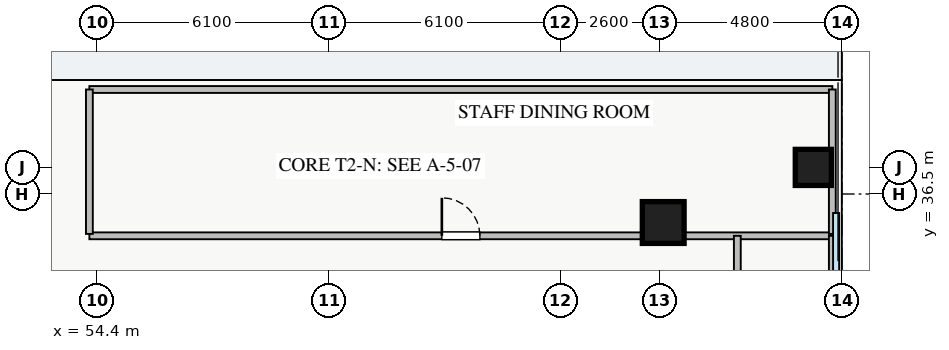
"""IFC4 building model, lengths in metres.
Left out: names, types, materials, properties, quantities, classifications, styles, units other than length and angle.
Written with IfcOpenShell. Run it as: python <this file> out.ifc"""

import sys

from ifc_helpers import new_model, si_unit, direction, frame, frame_2d, origin, origin_2d, place, context, subcontext, project, spatial, rectangle, extrude, source, transform, mapped, element, fill, save


model = new_model("IFC4")
c1 = context("Model", 3, precision=1e-05, world=origin(), true_north=direction((0.0, 1.0)))
c2 = subcontext(c1, "Body", "Model", "MODEL_VIEW")
j1 = project(units=[si_unit("LENGTHUNIT", "METRE"), si_unit("PLANEANGLEUNIT", "RADIAN")], contexts=[c1])
p1 = place(None, origin())
s1 = spatial("IfcSite", under=j1, at=p1, CompositionType="ELEMENT")
p2 = place(p1, origin())
s2 = spatial("IfcBuilding", under=s1, at=p2, CompositionType="ELEMENT")
p3 = place(p2, frame((0.0, 0.0, 18.2)))
s3 = spatial("IfcBuildingStorey", under=s2, at=p3, CompositionType="ELEMENT", Elevation=18.2)
m1 = source(origin(), c2, "Body", "SweptSolid", [
    extrude(rectangle(XDim=1.1, YDim=1.1, at=origin_2d()), origin(), (0.0, 0.0, 1.0), 4.8),
])
p4 = place(p3, frame((69.3, 35.75, 0.0), z_axis=(0.0, 0.0, 1.0), x_axis=(1.0, 0.0, 0.0)))
e1 = element("IfcColumn", 1, at=p4, inside=s3, PredefinedType="COLUMN", context=c2, shape_type="MappedRepresentation", body=[
    mapped(m1, transform((0.0, 0.0, 0.0), x_axis=(1.0, 0.0, 0.0), y_axis=(0.0, 1.0, 0.0), z_axis=(0.0, 0.0, 1.0), scale=1.0)),
])
m2 = source(origin(), c2, "Body", "SweptSolid", [
    extrude(rectangle(XDim=0.95, YDim=0.95, at=origin_2d()), origin(), (0.0, 0.0, 1.0), 4.8),
])
p5 = place(p3, frame((73.25, 37.2, 0.0), z_axis=(0.0, 0.0, 1.0), x_axis=(1.0, 0.0, 0.0)))
e2 = element("IfcColumn", 2, at=p5, inside=s3, PredefinedType="COLUMN", context=c2, shape_type="MappedRepresentation", body=[
    mapped(m2, transform((0.0, 0.0, 0.0), x_axis=(1.0, 0.0, 0.0), y_axis=(0.0, 1.0, 0.0), z_axis=(0.0, 0.0, 1.0), scale=1.0)),
])
p6 = place(p3, frame((54.2, 35.4, 0.0), z_axis=(0.0, 0.0, 1.0), x_axis=(1.0, 0.0, 0.0)))
e3 = element("IfcWall", 3, at=p6, inside=s3, PredefinedType="PARTITIONING", context=c2, shape_type="SweptSolid", body=[
    extrude(rectangle(XDim=19.55, YDim=0.18, at=frame_2d((9.775, 0.0))), origin(), (0.0, 0.0, 1.0), 4.62),
])
p7 = place(p6, frame((9.275, 0.0, 0.0)))
e4 = element("IfcOpeningElement", 4, at=p7, cuts=e3, PredefinedType="OPENING", context=c2, shape_type="SweptSolid", body=[
    extrude(rectangle(XDim=1.0, YDim=2.05, at=frame_2d((0.5, 1.025))), frame((0.0, 0.1, 0.0), z_axis=(0.0, -1.0, 0.0), x_axis=(1.0, 0.0, 0.0)), (0.0, 0.0, 1.0), 0.2),
])
p8 = place(p3, frame((71.25, 10.6, 0.0), z_axis=(0.0, 0.0, 1.0), x_axis=(0.0, 1.0, 0.0)))
e5 = element("IfcWall", 5, at=p8, inside=s3, PredefinedType="PARTITIONING", context=c2, shape_type="SweptSolid", body=[
    extrude(rectangle(XDim=24.8, YDim=0.18, at=frame_2d((12.4, 0.0))), origin(), (0.0, 0.0, 1.0), 4.62),
])
p9 = place(p8, frame((11.9, 0.0, 0.0)))
e6 = element("IfcOpeningElement", 6, at=p9, cuts=e5, PredefinedType="OPENING", context=c2, shape_type="SweptSolid", body=[
    extrude(rectangle(XDim=1.0, YDim=2.05, at=frame_2d((0.5, 1.025))), frame((0.0, 0.1, 0.0), z_axis=(0.0, -1.0, 0.0), x_axis=(1.0, 0.0, 0.0)), (0.0, 0.0, 1.0), 0.2),
])
p10 = place(p3, frame((73.75, 10.6, 0.0), z_axis=(0.0, 0.0, 1.0), x_axis=(0.0, 1.0, 0.0)))
e7 = element("IfcWall", 7, at=p10, inside=s3, PredefinedType="PARTITIONING", context=c2, shape_type="SweptSolid", body=[
    extrude(rectangle(XDim=24.8, YDim=0.18, at=frame_2d((12.4, 0.0))), origin(), (0.0, 0.0, 1.0), 4.62),
])
p11 = place(p3, frame((54.2, 39.25, 0.0), z_axis=(0.0, 0.0, 1.0), x_axis=(1.0, 0.0, 0.0)))
e8 = element("IfcWall", 8, at=p11, inside=s3, PredefinedType="PARTITIONING", context=c2, shape_type="SweptSolid", body=[
    extrude(rectangle(XDim=19.55, YDim=0.18, at=frame_2d((9.775, 0.0))), origin(), (0.0, 0.0, 1.0), 4.62),
])
for number, where, z_axis, x_axis in (
    (9, (54.2, 35.45, 0.0), (0.0, 0.0, 1.0), (0.0, 1.0, 0.0)),
    (10, (73.75, 35.45, 0.0), (0.0, 0.0, 1.0), (0.0, 1.0, 0.0)),
):
    element("IfcWall", number, at=place(p3, frame(where, z_axis=z_axis, x_axis=x_axis)), inside=s3, PredefinedType="PARTITIONING", context=c2, shape_type="SweptSolid", body=[
        extrude(rectangle(XDim=3.8, YDim=0.18, at=frame_2d((1.9, 0.0))), origin(), (0.0, 0.0, 1.0), 4.62),
    ])
m3 = source(origin(), c2, "Body", "SweptSolid", [
    extrude(rectangle(XDim=1.0, YDim=2.05, at=frame_2d((0.5, 1.025))), frame((0.0, 0.025, 0.0), z_axis=(0.0, -1.0, 0.0), x_axis=(1.0, 0.0, 0.0)), (0.0, 0.0, 1.0), 0.05),
])
p12 = place(p7, origin())
e11 = element("IfcDoor", 11, at=p12, inside=s3, OperationType="SINGLE_SWING_LEFT", PredefinedType="DOOR", context=c2, shape_type="MappedRepresentation", body=[
    mapped(m3, transform((0.0, 0.0, 0.0), x_axis=(1.0, 0.0, 0.0), y_axis=(0.0, 1.0, 0.0), z_axis=(0.0, 0.0, 1.0), scale=1.0)),
])
fill(e4, e11)
save(model, sys.argv[1])
